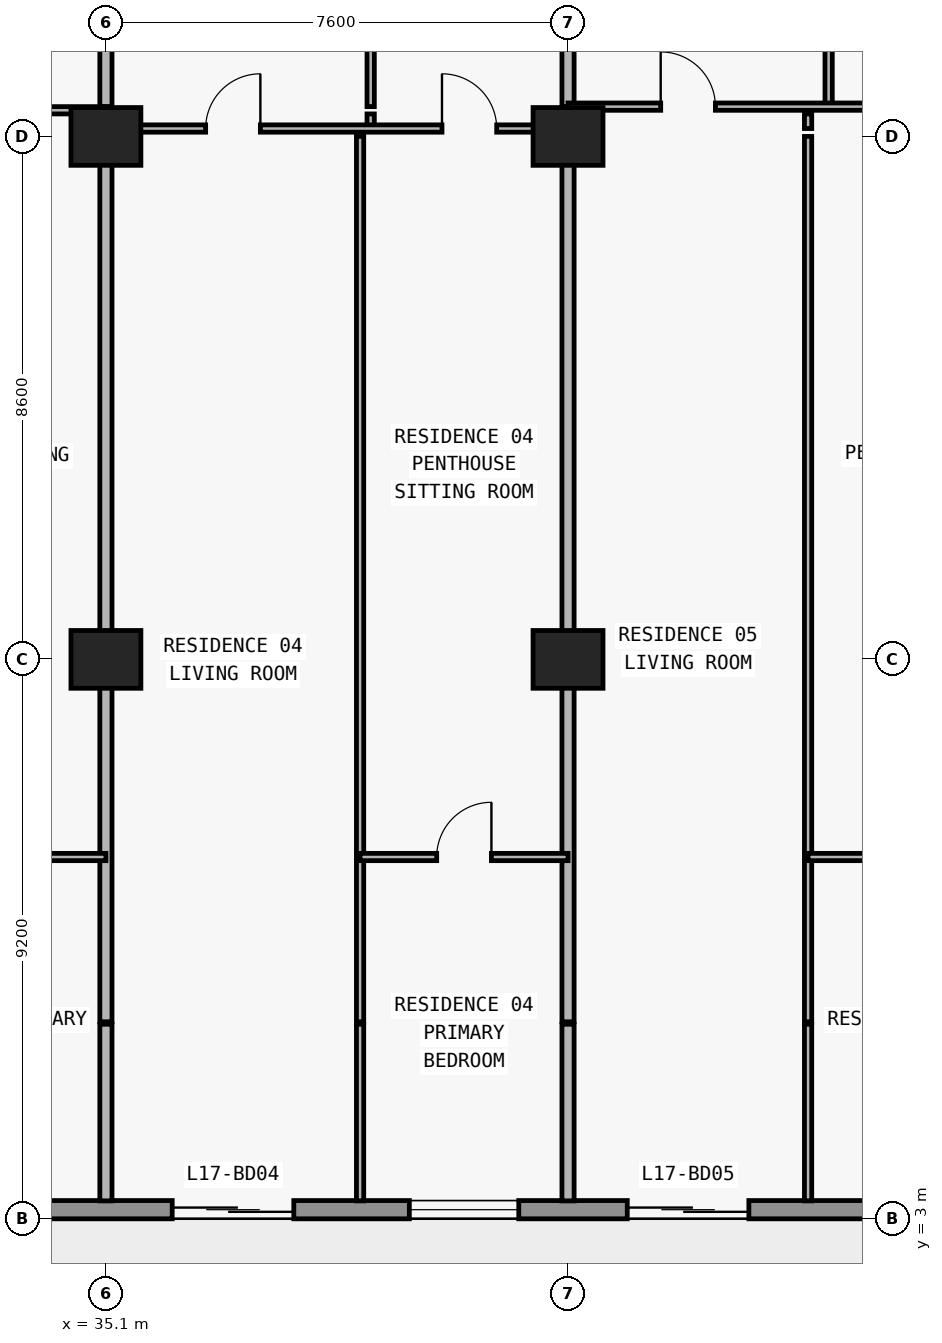
"""IFC4 building model, lengths in metres.
Left out: names, types, materials, properties, quantities, classifications, styles, units other than length and angle.
Written with IfcOpenShell. Run it as: python <this file> out.ifc"""

import sys

from ifc_helpers import new_model, si_unit, direction, frame, frame_2d, origin, origin_2d, place, context, subcontext, project, spatial, rectangle, extrude, element, fill, save


model = new_model("IFC4")
c1 = context("Model", 3, precision=1e-05, world=origin(), true_north=direction((0.0, 1.0)))
c2 = subcontext(c1, "Body", "Model", "MODEL_VIEW")
j1 = project(units=[si_unit("LENGTHUNIT", "METRE"), si_unit("PLANEANGLEUNIT", "RADIAN")], contexts=[c1])
p1 = place(None, origin())
s1 = spatial("IfcSite", under=j1, at=p1, CompositionType="ELEMENT")
p2 = place(p1, origin())
s2 = spatial("IfcBuilding", under=s1, at=p2, CompositionType="ELEMENT")
p3 = place(p2, frame((0.0, 0.0, 66.3)))
s3 = spatial("IfcBuildingStorey", under=s2, at=p3, CompositionType="ELEMENT", Elevation=66.3)
for number, where, z_axis, x_axis in (
    (1, (35.1, 12.2, 0.0), (0.0, 0.0, 1.0), (1.0, 0.0, 0.0)),
    (2, (42.7, 12.2, 0.0), (0.0, 0.0, 1.0), (1.0, 0.0, 0.0)),
    (3, (35.1, 20.8, 0.0), (0.0, 0.0, 1.0), (1.0, 0.0, 0.0)),
    (4, (42.7, 20.8, 0.0), (0.0, 0.0, 1.0), (1.0, 0.0, 0.0)),
):
    element("IfcColumn", number, at=place(p3, frame(where, z_axis=z_axis, x_axis=x_axis)), inside=s3, PredefinedType="COLUMN", context=c2, shape_type="SweptSolid", body=[
        extrude(rectangle(XDim=1.15, YDim=0.95, at=origin_2d()), origin(), (0.0, 0.0, 1.0), 3.05),
    ])
p4 = place(p3, frame((72.7, 3.15, 0.0), z_axis=(0.0, 0.0, 1.0), x_axis=(-1.0, 0.0, 0.0)))
e5 = element("IfcWall", 5, at=p4, inside=s3, PredefinedType="STANDARD", context=c2, shape_type="SweptSolid", body=[
    extrude(rectangle(XDim=67.6, YDim=0.3, at=frame_2d((33.8, 0.0))), origin(), (0.0, 0.0, 1.0), 3.05),
])
p5 = place(p4, frame((59.826, 0.0, 0.0)))
e6 = element("IfcOpeningElement", 6, at=p5, cuts=e5, PredefinedType="OPENING", context=c2, shape_type="SweptSolid", body=[
    extrude(rectangle(XDim=2.0, YDim=2.3, at=frame_2d((1.0, 1.15))), frame((0.0, 0.16, 0.0), z_axis=(0.0, -1.0, 0.0), x_axis=(1.0, 0.0, 0.0)), (0.0, 0.0, 1.0), 0.32),
])
p6 = place(p4, frame((55.526, 0.0, 0.85)))
e7 = element("IfcOpeningElement", 7, at=p6, cuts=e5, PredefinedType="OPENING", context=c2, shape_type="SweptSolid", body=[
    extrude(rectangle(XDim=2.2, YDim=1.55, at=frame_2d((1.1, 0.775))), frame((0.0, 0.16, 0.0), z_axis=(0.0, -1.0, 0.0), x_axis=(1.0, 0.0, 0.0)), (0.0, 0.0, 1.0), 0.32),
])
p7 = place(p4, frame((51.09, 0.0, 0.0)))
e8 = element("IfcOpeningElement", 8, at=p7, cuts=e5, PredefinedType="OPENING", context=c2, shape_type="SweptSolid", body=[
    extrude(rectangle(XDim=2.0, YDim=2.3, at=frame_2d((1.0, 1.15))), frame((0.0, 0.16, 0.0), z_axis=(0.0, -1.0, 0.0), x_axis=(1.0, 0.0, 0.0)), (0.0, 0.0, 1.0), 0.32),
])
p8 = place(p4, frame((46.99, 0.0, 0.85)))
e9 = element("IfcOpeningElement", 9, at=p8, cuts=e5, PredefinedType="OPENING", context=c2, shape_type="SweptSolid", body=[
    extrude(rectangle(XDim=1.8, YDim=1.55, at=frame_2d((0.9, 0.775))), frame((0.0, 0.16, 0.0), z_axis=(0.0, -1.0, 0.0), x_axis=(1.0, 0.0, 0.0)), (0.0, 0.0, 1.0), 0.32),
])
p9 = place(p4, frame((43.026, 0.0, 0.0)))
e10 = element("IfcOpeningElement", 10, at=p9, cuts=e5, PredefinedType="OPENING", context=c2, shape_type="SweptSolid", body=[
    extrude(rectangle(XDim=2.0, YDim=2.3, at=frame_2d((1.0, 1.15))), frame((0.0, 0.16, 0.0), z_axis=(0.0, -1.0, 0.0), x_axis=(1.0, 0.0, 0.0)), (0.0, 0.0, 1.0), 0.32),
])
p10 = place(p4, frame((38.726, 0.0, 0.85)))
e11 = element("IfcOpeningElement", 11, at=p10, cuts=e5, PredefinedType="OPENING", context=c2, shape_type="SweptSolid", body=[
    extrude(rectangle(XDim=2.2, YDim=1.55, at=frame_2d((1.1, 0.775))), frame((0.0, 0.16, 0.0), z_axis=(0.0, -1.0, 0.0), x_axis=(1.0, 0.0, 0.0)), (0.0, 0.0, 1.0), 0.32),
])
p11 = place(p4, frame((34.51, 0.0, 0.0)))
e12 = element("IfcOpeningElement", 12, at=p11, cuts=e5, PredefinedType="OPENING", context=c2, shape_type="SweptSolid", body=[
    extrude(rectangle(XDim=2.0, YDim=2.3, at=frame_2d((1.0, 1.15))), frame((0.0, 0.16, 0.0), z_axis=(0.0, -1.0, 0.0), x_axis=(1.0, 0.0, 0.0)), (0.0, 0.0, 1.0), 0.32),
])
p12 = place(p4, frame((30.81, 0.0, 0.85)))
e13 = element("IfcOpeningElement", 13, at=p12, cuts=e5, PredefinedType="OPENING", context=c2, shape_type="SweptSolid", body=[
    extrude(rectangle(XDim=1.8, YDim=1.55, at=frame_2d((0.9, 0.775))), frame((0.0, 0.16, 0.0), z_axis=(0.0, -1.0, 0.0), x_axis=(1.0, 0.0, 0.0)), (0.0, 0.0, 1.0), 0.32),
])
p13 = place(p4, frame((27.026, 0.0, 0.0)))
e14 = element("IfcOpeningElement", 14, at=p13, cuts=e5, PredefinedType="OPENING", context=c2, shape_type="SweptSolid", body=[
    extrude(rectangle(XDim=2.0, YDim=2.3, at=frame_2d((1.0, 1.15))), frame((0.0, 0.16, 0.0), z_axis=(0.0, -1.0, 0.0), x_axis=(1.0, 0.0, 0.0)), (0.0, 0.0, 1.0), 0.32),
])
p14 = place(p4, frame((22.726, 0.0, 0.85)))
e15 = element("IfcOpeningElement", 15, at=p14, cuts=e5, PredefinedType="OPENING", context=c2, shape_type="SweptSolid", body=[
    extrude(rectangle(XDim=2.2, YDim=1.55, at=frame_2d((1.1, 0.775))), frame((0.0, 0.16, 0.0), z_axis=(0.0, -1.0, 0.0), x_axis=(1.0, 0.0, 0.0)), (0.0, 0.0, 1.0), 0.32),
])
p15 = place(p4, frame((18.29, 0.0, 0.0)))
e16 = element("IfcOpeningElement", 16, at=p15, cuts=e5, PredefinedType="OPENING", context=c2, shape_type="SweptSolid", body=[
    extrude(rectangle(XDim=2.0, YDim=2.3, at=frame_2d((1.0, 1.15))), frame((0.0, 0.16, 0.0), z_axis=(0.0, -1.0, 0.0), x_axis=(1.0, 0.0, 0.0)), (0.0, 0.0, 1.0), 0.32),
])
p16 = place(p4, frame((14.19, 0.0, 0.85)))
e17 = element("IfcOpeningElement", 17, at=p16, cuts=e5, PredefinedType="OPENING", context=c2, shape_type="SweptSolid", body=[
    extrude(rectangle(XDim=1.8, YDim=1.55, at=frame_2d((0.9, 0.775))), frame((0.0, 0.16, 0.0), z_axis=(0.0, -1.0, 0.0), x_axis=(1.0, 0.0, 0.0)), (0.0, 0.0, 1.0), 0.32),
])
p17 = place(p4, frame((10.226, 0.0, 0.0)))
e18 = element("IfcOpeningElement", 18, at=p17, cuts=e5, PredefinedType="OPENING", context=c2, shape_type="SweptSolid", body=[
    extrude(rectangle(XDim=2.0, YDim=2.3, at=frame_2d((1.0, 1.15))), frame((0.0, 0.16, 0.0), z_axis=(0.0, -1.0, 0.0), x_axis=(1.0, 0.0, 0.0)), (0.0, 0.0, 1.0), 0.32),
])
p18 = place(p4, frame((5.926, 0.0, 0.85)))
e19 = element("IfcOpeningElement", 19, at=p18, cuts=e5, PredefinedType="OPENING", context=c2, shape_type="SweptSolid", body=[
    extrude(rectangle(XDim=2.2, YDim=1.55, at=frame_2d((1.1, 0.775))), frame((0.0, 0.16, 0.0), z_axis=(0.0, -1.0, 0.0), x_axis=(1.0, 0.0, 0.0)), (0.0, 0.0, 1.0), 0.32),
])
p19 = place(p3, frame((35.1, 3.295, 0.0), z_axis=(0.0, 0.0, 1.0), x_axis=(0.0, 1.0, 0.0)))
e20 = element("IfcWall", 20, at=p19, inside=s3, PredefinedType="PARTITIONING", context=c2, shape_type="SweptSolid", body=[
    extrude(rectangle(XDim=2.905, YDim=0.2, at=frame_2d((1.453, 0.0))), origin(), (0.0, 0.0, 1.0), 3.05),
])
p20 = place(p3, frame((35.1, 6.24, 0.0), z_axis=(0.0, 0.0, 1.0), x_axis=(0.0, 1.0, 0.0)))
e21 = element("IfcWall", 21, at=p20, inside=s3, PredefinedType="PARTITIONING", context=c2, shape_type="SweptSolid", body=[
    extrude(rectangle(XDim=14.56, YDim=0.2, at=frame_2d((7.28, 0.0))), origin(), (0.0, 0.0, 1.0), 2.11),
])
p21 = place(p3, frame((35.1, 20.93, 0.0), z_axis=(0.0, 0.0, 1.0), x_axis=(0.0, 1.0, 0.0)))
e22 = element("IfcWall", 22, at=p21, inside=s3, PredefinedType="PARTITIONING", context=c2, shape_type="SweptSolid", body=[
    extrude(rectangle(XDim=0.24, YDim=0.2, at=frame_2d((0.12, 0.0))), origin(), (0.0, 0.0, 1.0), 3.05),
])
p22 = place(p3, frame((35.1, 21.29, 0.0), z_axis=(0.0, 0.0, 1.0), x_axis=(0.0, 1.0, 0.0)))
e23 = element("IfcWall", 23, at=p22, inside=s3, PredefinedType="PARTITIONING", context=c2, shape_type="SweptSolid", body=[
    extrude(rectangle(XDim=4.69, YDim=0.2, at=frame_2d((2.345, 0.0))), origin(), (0.0, 0.0, 1.0), 2.11),
])
p23 = place(p3, frame((39.28, 3.295, 0.0), z_axis=(0.0, 0.0, 1.0), x_axis=(0.0, 1.0, 0.0)))
e24 = element("IfcWall", 24, at=p23, inside=s3, PredefinedType="PARTITIONING", context=c2, shape_type="SweptSolid", body=[
    extrude(rectangle(XDim=2.905, YDim=0.12, at=frame_2d((1.453, 0.0))), origin(), (0.0, 0.0, 1.0), 3.05),
])
p24 = place(p3, frame((39.28, 6.24, 0.0), z_axis=(0.0, 0.0, 1.0), x_axis=(0.0, 1.0, 0.0)))
e25 = element("IfcWall", 25, at=p24, inside=s3, PredefinedType="PARTITIONING", context=c2, shape_type="SweptSolid", body=[
    extrude(rectangle(XDim=14.56, YDim=0.12, at=frame_2d((7.28, 0.0))), origin(), (0.0, 0.0, 1.0), 3.05),
])
p25 = place(p3, frame((39.454, 20.93, 0.0), z_axis=(0.0, 0.0, 1.0), x_axis=(0.0, 1.0, 0.0)))
e26 = element("IfcWall", 26, at=p25, inside=s3, PredefinedType="PARTITIONING", context=c2, shape_type="SweptSolid", body=[
    extrude(rectangle(XDim=0.24, YDim=0.12, at=frame_2d((0.12, 0.0))), origin(), (0.0, 0.0, 1.0), 3.05),
])
p26 = place(p3, frame((39.454, 21.29, 0.0), z_axis=(0.0, 0.0, 1.0), x_axis=(0.0, 1.0, 0.0)))
e27 = element("IfcWall", 27, at=p26, inside=s3, PredefinedType="PARTITIONING", context=c2, shape_type="SweptSolid", body=[
    extrude(rectangle(XDim=4.69, YDim=0.12, at=frame_2d((2.345, 0.0))), origin(), (0.0, 0.0, 1.0), 3.05),
])
p27 = place(p26, frame((1.895, 0.0, 0.0)))
e28 = element("IfcOpeningElement", 28, at=p27, cuts=e27, PredefinedType="OPENING", context=c2, shape_type="SweptSolid", body=[
    extrude(rectangle(XDim=0.9, YDim=2.15, at=frame_2d((0.45, 1.075))), frame((0.0, 0.07, 0.0), z_axis=(0.0, -1.0, 0.0), x_axis=(1.0, 0.0, 0.0)), (0.0, 0.0, 1.0), 0.14),
])
p28 = place(p3, frame((42.7, 3.295, 0.0), z_axis=(0.0, 0.0, 1.0), x_axis=(0.0, 1.0, 0.0)))
e29 = element("IfcWall", 29, at=p28, inside=s3, PredefinedType="PARTITIONING", context=c2, shape_type="SweptSolid", body=[
    extrude(rectangle(XDim=2.905, YDim=0.2, at=frame_2d((1.453, 0.0))), origin(), (0.0, 0.0, 1.0), 3.05),
])
p29 = place(p3, frame((42.7, 6.24, 0.0), z_axis=(0.0, 0.0, 1.0), x_axis=(0.0, 1.0, 0.0)))
e30 = element("IfcWall", 30, at=p29, inside=s3, PredefinedType="PARTITIONING", context=c2, shape_type="SweptSolid", body=[
    extrude(rectangle(XDim=14.56, YDim=0.2, at=frame_2d((7.28, 0.0))), origin(), (0.0, 0.0, 1.0), 2.11),
])
p30 = place(p3, frame((42.7, 20.93, 0.0), z_axis=(0.0, 0.0, 1.0), x_axis=(0.0, 1.0, 0.0)))
e31 = element("IfcWall", 31, at=p30, inside=s3, PredefinedType="PARTITIONING", context=c2, shape_type="SweptSolid", body=[
    extrude(rectangle(XDim=0.24, YDim=0.2, at=frame_2d((0.12, 0.0))), origin(), (0.0, 0.0, 1.0), 3.05),
])
p31 = place(p3, frame((42.7, 21.29, 0.0), z_axis=(0.0, 0.0, 1.0), x_axis=(0.0, 1.0, 0.0)))
e32 = element("IfcWall", 32, at=p31, inside=s3, PredefinedType="PARTITIONING", context=c2, shape_type="SweptSolid", body=[
    extrude(rectangle(XDim=4.69, YDim=0.2, at=frame_2d((2.345, 0.0))), origin(), (0.0, 0.0, 1.0), 2.11),
])
p32 = place(p3, frame((46.648, 3.295, 0.0), z_axis=(0.0, 0.0, 1.0), x_axis=(0.0, 1.0, 0.0)))
e33 = element("IfcWall", 33, at=p32, inside=s3, PredefinedType="PARTITIONING", context=c2, shape_type="SweptSolid", body=[
    extrude(rectangle(XDim=2.905, YDim=0.12, at=frame_2d((1.453, 0.0))), origin(), (0.0, 0.0, 1.0), 3.05),
])
p33 = place(p3, frame((46.648, 6.24, 0.0), z_axis=(0.0, 0.0, 1.0), x_axis=(0.0, 1.0, 0.0)))
e34 = element("IfcWall", 34, at=p33, inside=s3, PredefinedType="PARTITIONING", context=c2, shape_type="SweptSolid", body=[
    extrude(rectangle(XDim=14.56, YDim=0.12, at=frame_2d((7.28, 0.0))), origin(), (0.0, 0.0, 1.0), 2.423),
])
p34 = place(p3, frame((46.648, 20.93, 0.0), z_axis=(0.0, 0.0, 1.0), x_axis=(0.0, 1.0, 0.0)))
e35 = element("IfcWall", 35, at=p34, inside=s3, PredefinedType="PARTITIONING", context=c2, shape_type="SweptSolid", body=[
    extrude(rectangle(XDim=0.24, YDim=0.12, at=frame_2d((0.12, 0.0))), origin(), (0.0, 0.0, 1.0), 2.423),
])
p35 = place(p3, frame((46.986, 21.29, 0.0), z_axis=(0.0, 0.0, 1.0), x_axis=(0.0, 1.0, 0.0)))
e36 = element("IfcWall", 36, at=p35, inside=s3, PredefinedType="PARTITIONING", context=c2, shape_type="SweptSolid", body=[
    extrude(rectangle(XDim=4.69, YDim=0.12, at=frame_2d((2.345, 0.0))), origin(), (0.0, 0.0, 1.0), 2.423),
])
p36 = place(p35, frame((1.895, 0.0, 0.0)))
e37 = element("IfcOpeningElement", 37, at=p36, cuts=e36, PredefinedType="OPENING", context=c2, shape_type="SweptSolid", body=[
    extrude(rectangle(XDim=0.9, YDim=2.15, at=frame_2d((0.45, 1.075))), frame((0.0, 0.07, 0.0), z_axis=(0.0, -1.0, 0.0), x_axis=(1.0, 0.0, 0.0)), (0.0, 0.0, 1.0), 0.14),
])
p37 = place(p3, frame((30.648, 8.95, 0.0), z_axis=(0.0, 0.0, 1.0), x_axis=(1.0, 0.0, 0.0)))
e38 = element("IfcWall", 38, at=p37, inside=s3, PredefinedType="PARTITIONING", context=c2, shape_type="SweptSolid", body=[
    extrude(rectangle(XDim=4.452, YDim=0.12, at=frame_2d((2.226, 0.0))), origin(), (0.0, 0.0, 1.0), 3.05),
])
p38 = place(p37, frame((1.776, 0.0, 0.0)))
e39 = element("IfcOpeningElement", 39, at=p38, cuts=e38, PredefinedType="OPENING", context=c2, shape_type="SweptSolid", body=[
    extrude(rectangle(XDim=0.9, YDim=2.15, at=frame_2d((0.45, 1.075))), frame((0.0, 0.07, 0.0), z_axis=(0.0, -1.0, 0.0), x_axis=(1.0, 0.0, 0.0)), (0.0, 0.0, 1.0), 0.14),
])
p39 = place(p3, frame((39.28, 8.95, 0.0), z_axis=(0.0, 0.0, 1.0), x_axis=(1.0, 0.0, 0.0)))
e40 = element("IfcWall", 40, at=p39, inside=s3, PredefinedType="PARTITIONING", context=c2, shape_type="SweptSolid", body=[
    extrude(rectangle(XDim=3.42, YDim=0.12, at=frame_2d((1.71, 0.0))), origin(), (0.0, 0.0, 1.0), 3.05),
])
p40 = place(p39, frame((1.26, 0.0, 0.0)))
e41 = element("IfcOpeningElement", 41, at=p40, cuts=e40, PredefinedType="OPENING", context=c2, shape_type="SweptSolid", body=[
    extrude(rectangle(XDim=0.9, YDim=2.15, at=frame_2d((0.45, 1.075))), frame((0.0, 0.07, 0.0), z_axis=(0.0, -1.0, 0.0), x_axis=(1.0, 0.0, 0.0)), (0.0, 0.0, 1.0), 0.14),
])
p41 = place(p3, frame((46.648, 8.95, 0.0), z_axis=(0.0, 0.0, 1.0), x_axis=(1.0, 0.0, 0.0)))
e42 = element("IfcWall", 42, at=p41, inside=s3, PredefinedType="PARTITIONING", context=c2, shape_type="SweptSolid", body=[
    extrude(rectangle(XDim=4.452, YDim=0.12, at=frame_2d((2.226, 0.0))), origin(), (0.0, 0.0, 1.0), 3.05),
])
p42 = place(p41, frame((1.776, 0.0, 0.0)))
e43 = element("IfcOpeningElement", 43, at=p42, cuts=e42, PredefinedType="OPENING", context=c2, shape_type="SweptSolid", body=[
    extrude(rectangle(XDim=0.9, YDim=2.15, at=frame_2d((0.45, 1.075))), frame((0.0, 0.07, 0.0), z_axis=(0.0, -1.0, 0.0), x_axis=(1.0, 0.0, 0.0)), (0.0, 0.0, 1.0), 0.14),
])
p43 = place(p3, frame((35.1, 20.93, 0.0), z_axis=(0.0, 0.0, 1.0), x_axis=(1.0, 0.0, 0.0)))
e44 = element("IfcWall", 44, at=p43, inside=s3, PredefinedType="PARTITIONING", context=c2, shape_type="SweptSolid", body=[
    extrude(rectangle(XDim=7.6, YDim=0.12, at=frame_2d((3.8, 0.0))), origin(), (0.0, 0.0, 1.0), 2.11),
])
p44 = place(p43, frame((1.64, 0.0, 0.0)))
e45 = element("IfcOpeningElement", 45, at=p44, cuts=e44, PredefinedType="OPENING", context=c2, shape_type="SweptSolid", body=[
    extrude(rectangle(XDim=0.9, YDim=2.06, at=frame_2d((0.45, 1.03))), frame((0.0, 0.07, 0.0), z_axis=(0.0, -1.0, 0.0), x_axis=(1.0, 0.0, 0.0)), (0.0, 0.0, 1.0), 0.14),
])
p45 = place(p43, frame((5.527, 0.0, 0.0)))
e46 = element("IfcOpeningElement", 46, at=p45, cuts=e44, PredefinedType="OPENING", context=c2, shape_type="SweptSolid", body=[
    extrude(rectangle(XDim=0.9, YDim=2.06, at=frame_2d((0.45, 1.03))), frame((0.0, 0.07, 0.0), z_axis=(0.0, -1.0, 0.0), x_axis=(1.0, 0.0, 0.0)), (0.0, 0.0, 1.0), 0.14),
])
p46 = place(p3, frame((26.97, 21.23, 0.0), z_axis=(0.0, 0.0, 1.0), x_axis=(1.0, 0.0, 0.0)))
e47 = element("IfcWall", 47, at=p46, inside=s3, PredefinedType="PARTITIONING", context=c2, shape_type="SweptSolid", body=[
    extrude(rectangle(XDim=8.13, YDim=0.12, at=frame_2d((4.065, 0.0))), origin(), (0.0, 0.0, 1.0), 3.05),
])
p47 = place(p46, frame((1.389, 0.0, 0.0)))
e48 = element("IfcOpeningElement", 48, at=p47, cuts=e47, PredefinedType="OPENING", context=c2, shape_type="SweptSolid", body=[
    extrude(rectangle(XDim=0.9, YDim=2.15, at=frame_2d((0.45, 1.075))), frame((0.0, 0.07, 0.0), z_axis=(0.0, -1.0, 0.0), x_axis=(1.0, 0.0, 0.0)), (0.0, 0.0, 1.0), 0.14),
])
p48 = place(p46, frame((5.748, 0.0, 0.0)))
e49 = element("IfcOpeningElement", 49, at=p48, cuts=e47, PredefinedType="OPENING", context=c2, shape_type="SweptSolid", body=[
    extrude(rectangle(XDim=0.9, YDim=2.15, at=frame_2d((0.45, 1.075))), frame((0.0, 0.07, 0.0), z_axis=(0.0, -1.0, 0.0), x_axis=(1.0, 0.0, 0.0)), (0.0, 0.0, 1.0), 0.14),
])
p49 = place(p3, frame((42.7, 21.29, 0.0), z_axis=(0.0, 0.0, 1.0), x_axis=(1.0, 0.0, 0.0)))
e50 = element("IfcWall", 50, at=p49, inside=s3, PredefinedType="PARTITIONING", context=c2, shape_type="SweptSolid", body=[
    extrude(rectangle(XDim=8.13, YDim=0.12, at=frame_2d((4.065, 0.0))), origin(), (0.0, 0.0, 1.0), 3.05),
])
p50 = place(p49, frame((1.524, 0.0, 0.0)))
e51 = element("IfcOpeningElement", 51, at=p50, cuts=e50, PredefinedType="OPENING", context=c2, shape_type="SweptSolid", body=[
    extrude(rectangle(XDim=0.9, YDim=2.15, at=frame_2d((0.45, 1.075))), frame((0.0, 0.07, 0.0), z_axis=(0.0, -1.0, 0.0), x_axis=(1.0, 0.0, 0.0)), (0.0, 0.0, 1.0), 0.14),
])
p51 = place(p49, frame((5.758, 0.0, 0.0)))
e52 = element("IfcOpeningElement", 52, at=p51, cuts=e50, PredefinedType="OPENING", context=c2, shape_type="SweptSolid", body=[
    extrude(rectangle(XDim=0.9, YDim=2.15, at=frame_2d((0.45, 1.075))), frame((0.0, 0.07, 0.0), z_axis=(0.0, -1.0, 0.0), x_axis=(1.0, 0.0, 0.0)), (0.0, 0.0, 1.0), 0.14),
])
p52 = place(p11, origin())
e53 = element("IfcDoor", 53, at=p52, inside=s3, OperationType="DOUBLE_DOOR_SLIDING", PredefinedType="DOOR", context=c2, shape_type="SweptSolid", body=[
    extrude(rectangle(XDim=2.0, YDim=2.3, at=frame_2d((1.0, 1.15))), frame((0.0, 0.025, 0.0), z_axis=(0.0, -1.0, 0.0), x_axis=(1.0, 0.0, 0.0)), (0.0, 0.0, 1.0), 0.05),
])
fill(e12, e53)
p53 = place(p12, origin())
e54 = element("IfcWindow", 54, at=p53, inside=s3, PartitioningType="SINGLE_PANEL", PredefinedType="WINDOW", context=c2, shape_type="SweptSolid", body=[
    extrude(rectangle(XDim=1.8, YDim=1.55, at=frame_2d((0.9, 0.775))), frame((0.0, 0.03, 0.0), z_axis=(0.0, -1.0, 0.0), x_axis=(1.0, 0.0, 0.0)), (0.0, 0.0, 1.0), 0.06),
])
fill(e13, e54)
p54 = place(p13, origin())
e55 = element("IfcDoor", 55, at=p54, inside=s3, OperationType="DOUBLE_DOOR_SLIDING", PredefinedType="DOOR", context=c2, shape_type="SweptSolid", body=[
    extrude(rectangle(XDim=2.0, YDim=2.3, at=frame_2d((1.0, 1.15))), frame((0.0, 0.025, 0.0), z_axis=(0.0, -1.0, 0.0), x_axis=(1.0, 0.0, 0.0)), (0.0, 0.0, 1.0), 0.05),
])
fill(e14, e55)
p55 = place(p44, origin())
e56 = element("IfcDoor", 56, at=p55, inside=s3, OperationType="SINGLE_SWING_RIGHT", PredefinedType="DOOR", context=c2, shape_type="SweptSolid", body=[
    extrude(rectangle(XDim=0.9, YDim=2.06, at=frame_2d((0.45, 1.03))), frame((0.0, 0.025, 0.0), z_axis=(0.0, -1.0, 0.0), x_axis=(1.0, 0.0, 0.0)), (0.0, 0.0, 1.0), 0.05),
])
fill(e45, e56)
p56 = place(p45, origin())
e57 = element("IfcDoor", 57, at=p56, inside=s3, OperationType="SINGLE_SWING_LEFT", PredefinedType="DOOR", context=c2, shape_type="SweptSolid", body=[
    extrude(rectangle(XDim=0.9, YDim=2.06, at=frame_2d((0.45, 1.03))), frame((0.0, 0.025, 0.0), z_axis=(0.0, -1.0, 0.0), x_axis=(1.0, 0.0, 0.0)), (0.0, 0.0, 1.0), 0.05),
])
fill(e46, e57)
p57 = place(p40, origin())
e58 = element("IfcDoor", 58, at=p57, inside=s3, OperationType="SINGLE_SWING_RIGHT", PredefinedType="DOOR", context=c2, shape_type="SweptSolid", body=[
    extrude(rectangle(XDim=0.9, YDim=2.15, at=frame_2d((0.45, 1.075))), frame((0.0, 0.025, 0.0), z_axis=(0.0, -1.0, 0.0), x_axis=(1.0, 0.0, 0.0)), (0.0, 0.0, 1.0), 0.05),
])
fill(e41, e58)
p58 = place(p50, origin())
e59 = element("IfcDoor", 59, at=p58, inside=s3, OperationType="SINGLE_SWING_LEFT", PredefinedType="DOOR", context=c2, shape_type="SweptSolid", body=[
    extrude(rectangle(XDim=0.9, YDim=2.15, at=frame_2d((0.45, 1.075))), frame((0.0, 0.025, 0.0), z_axis=(0.0, -1.0, 0.0), x_axis=(1.0, 0.0, 0.0)), (0.0, 0.0, 1.0), 0.05),
])
fill(e51, e59)
save(model, sys.argv[1])
